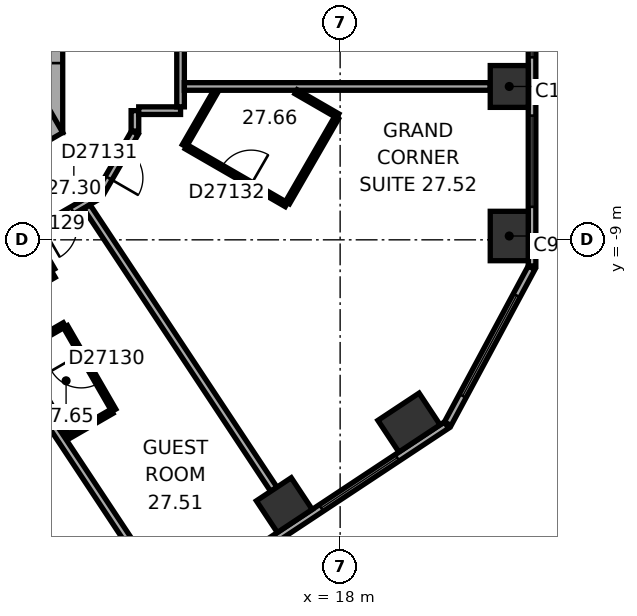
"""IFC4 building model, lengths in metres.
Left out: names, types, materials, properties, quantities, classifications, styles, units other than length and angle.
Written with IfcOpenShell. Run it as: python <this file> out.ifc"""

import sys

from ifc_helpers import new_model, si_unit, direction, frame, frame_2d, origin, origin_2d, place, context, subcontext, project, spatial, rectangle, extrude, element, fill, save


model = new_model("IFC4")
c1 = context("Model", 3, precision=1e-05, world=origin(), true_north=direction((0.0, 1.0)))
c2 = subcontext(c1, "Body", "Model", "MODEL_VIEW")
j1 = project(units=[si_unit("LENGTHUNIT", "METRE"), si_unit("PLANEANGLEUNIT", "RADIAN")], contexts=[c1])
p1 = place(None, origin())
s1 = spatial("IfcSite", under=j1, at=p1, CompositionType="ELEMENT")
p2 = place(p1, origin())
s2 = spatial("IfcBuilding", under=s1, at=p2, CompositionType="ELEMENT")
p3 = place(p2, frame((0.0, 0.0, 113.3)))
s3 = spatial("IfcBuildingStorey", under=s2, at=p3, CompositionType="ELEMENT", Elevation=113.3)
p4 = place(p3, frame((22.45, -8.899, 0.0), z_axis=(0.0, 0.0, 1.0), x_axis=(0.0, 1.0, 0.0)))
e1 = element("IfcColumn", 1, at=p4, inside=s3, PredefinedType="COLUMN", context=c2, shape_type="SweptSolid", body=[
    extrude(rectangle(XDim=1.3, YDim=1.0, at=origin_2d()), origin(), (0.0, 0.0, 1.0), 3.3),
])
for number, where, z_axis, x_axis in (
    (2, (22.45, -4.965, 0.0), (0.0, 0.0, 1.0), (0.0, 1.0, 0.0)),
    (3, (16.531, -15.981, 0.0), (0.0, 0.0, 1.0), (0.834, 0.552, 0.0)),
):
    element("IfcColumn", number, at=place(p3, frame(where, z_axis=z_axis, x_axis=x_axis)), inside=s3, PredefinedType="COLUMN", context=c2, shape_type="SweptSolid", body=[
        extrude(rectangle(XDim=1.1, YDim=1.0, at=origin_2d()), origin(), (0.0, 0.0, 1.0), 3.3),
    ])
p5 = place(p3, frame((19.812, -13.809, 0.0), z_axis=(0.0, 0.0, 1.0), x_axis=(0.833885822067, 0.551936985312, 0.0)))
e4 = element("IfcColumn", 4, at=p5, inside=s3, PredefinedType="COLUMN", context=c2, shape_type="SweptSolid", body=[
    extrude(rectangle(XDim=1.3, YDim=1.0, at=origin_2d()), origin(), (0.0, 0.0, 1.0), 3.3),
])
p6 = place(p3, frame((10.1, -6.177, 0.0), z_axis=(0.0, 0.0, 1.0), x_axis=(0.0, 1.0, 0.0)))
e5 = element("IfcWall", 5, at=p6, inside=s3, PredefinedType="SHEAR", context=c2, shape_type="SweptSolid", body=[
    extrude(rectangle(XDim=12.355, YDim=1.2, at=frame_2d((6.177, 0.0))), origin(), (0.0, 0.0, 1.0), 3.3),
])
p7 = place(p6, frame((6.378, 0.0, 0.0)))
e6 = element("IfcOpeningElement", 6, at=p7, cuts=e5, PredefinedType="OPENING", context=c2, shape_type="SweptSolid", body=[
    extrude(rectangle(XDim=1.5, YDim=2.1, at=frame_2d((0.75, 1.05))), frame((0.0, 0.61, 0.0), z_axis=(0.0, -1.0, 0.0), x_axis=(1.0, 0.0, 0.0)), (0.0, 0.0, 1.0), 1.22),
])
p8 = place(p6, frame((1.828, 0.0, 0.0)))
e7 = element("IfcOpeningElement", 7, at=p8, cuts=e5, PredefinedType="OPENING", context=c2, shape_type="SweptSolid", body=[
    extrude(rectangle(XDim=1.1, YDim=2.1, at=frame_2d((0.55, 1.05))), frame((0.0, 0.61, 0.0), z_axis=(0.0, -1.0, 0.0), x_axis=(1.0, 0.0, 0.0)), (0.0, 0.0, 1.0), 1.22),
])
p9 = place(p6, frame((4.427, 0.0, 0.0)))
e8 = element("IfcOpeningElement", 8, at=p9, cuts=e5, PredefinedType="OPENING", context=c2, shape_type="SweptSolid", body=[
    extrude(rectangle(XDim=1.1, YDim=2.1, at=frame_2d((0.55, 1.05))), frame((0.0, 0.61, 0.0), z_axis=(0.0, -1.0, 0.0), x_axis=(1.0, 0.0, 0.0)), (0.0, 0.0, 1.0), 1.22),
])
p10 = place(p3, frame((-0.3, -11.836, 0.0), z_axis=(0.0, 0.0, 1.0), x_axis=(0.866021384402, 0.500006961711, 0.0)))
e9 = element("IfcWall", 9, at=p10, inside=s3, PredefinedType="SHEAR", context=c2, shape_type="SweptSolid", body=[
    extrude(rectangle(XDim=12.355, YDim=1.2, at=frame_2d((6.178, 0.0))), origin(), (0.0, 0.0, 1.0), 3.3),
])
p11 = place(p10, frame((4.128, 0.0, 0.0)))
e10 = element("IfcOpeningElement", 10, at=p11, cuts=e9, PredefinedType="OPENING", context=c2, shape_type="SweptSolid", body=[
    extrude(rectangle(XDim=0.9, YDim=2.1, at=frame_2d((0.45, 1.05))), frame((0.0, 0.61, 0.0), z_axis=(0.0, -1.0, 0.0), x_axis=(1.0, 0.0, 0.0)), (0.0, 0.0, 1.0), 1.22),
])
p12 = place(p10, frame((7.928, 0.0, 0.0)))
e11 = element("IfcOpeningElement", 11, at=p12, cuts=e9, PredefinedType="OPENING", context=c2, shape_type="SweptSolid", body=[
    extrude(rectangle(XDim=1.1, YDim=2.1, at=frame_2d((0.55, 1.05))), frame((0.0, 0.61, 0.0), z_axis=(0.0, -1.0, 0.0), x_axis=(1.0, 0.0, 0.0)), (0.0, 0.0, 1.0), 1.22),
])
p13 = place(p3, frame((23.05, -9.687, 0.0), z_axis=(0.0, 0.0, 1.0), x_axis=(0.0, 1.0, 0.0)))
e12 = element("IfcWall", 12, at=p13, inside=s3, PredefinedType="STANDARD", context=c2, shape_type="SweptSolid", body=[
    extrude(rectangle(XDim=21.246, YDim=0.2, at=frame_2d((10.623, 0.0))), origin(), (0.0, 0.0, 1.0), 3.3),
])
p14 = place(p13, frame((1.555, 0.0, 0.8)))
e13 = element("IfcOpeningElement", 13, at=p14, cuts=e12, PredefinedType="OPENING", context=c2, shape_type="SweptSolid", body=[
    extrude(rectangle(XDim=2.4, YDim=1.7, at=frame_2d((1.2, 0.85))), frame((0.0, 0.11, 0.0), z_axis=(0.0, -1.0, 0.0), x_axis=(1.0, 0.0, 0.0)), (0.0, 0.0, 1.0), 0.22),
])
p15 = place(p13, frame((5.489, 0.0, 0.8)))
e14 = element("IfcOpeningElement", 14, at=p15, cuts=e12, PredefinedType="OPENING", context=c2, shape_type="SweptSolid", body=[
    extrude(rectangle(XDim=2.4, YDim=1.7, at=frame_2d((1.2, 0.85))), frame((0.0, 0.11, 0.0), z_axis=(0.0, -1.0, 0.0), x_axis=(1.0, 0.0, 0.0)), (0.0, 0.0, 1.0), 0.22),
])
p16 = place(p13, frame((9.424, 0.0, 0.8)))
e15 = element("IfcOpeningElement", 15, at=p16, cuts=e12, PredefinedType="OPENING", context=c2, shape_type="SweptSolid", body=[
    extrude(rectangle(XDim=2.4, YDim=1.7, at=frame_2d((1.2, 0.85))), frame((0.0, 0.11, 0.0), z_axis=(0.0, -1.0, 0.0), x_axis=(1.0, 0.0, 0.0)), (0.0, 0.0, 1.0), 0.22),
])
p17 = place(p13, frame((13.358, 0.0, 0.8)))
e16 = element("IfcOpeningElement", 16, at=p17, cuts=e12, PredefinedType="OPENING", context=c2, shape_type="SweptSolid", body=[
    extrude(rectangle(XDim=2.4, YDim=1.7, at=frame_2d((1.2, 0.85))), frame((0.0, 0.11, 0.0), z_axis=(0.0, -1.0, 0.0), x_axis=(1.0, 0.0, 0.0)), (0.0, 0.0, 1.0), 0.22),
])
p18 = place(p13, frame((17.293, 0.0, 0.8)))
e17 = element("IfcOpeningElement", 17, at=p18, cuts=e12, PredefinedType="OPENING", context=c2, shape_type="SweptSolid", body=[
    extrude(rectangle(XDim=2.4, YDim=1.7, at=frame_2d((1.2, 0.85))), frame((0.0, 0.11, 0.0), z_axis=(0.0, -1.0, 0.0), x_axis=(1.0, 0.0, 0.0)), (0.0, 0.0, 1.0), 0.22),
])
p19 = place(p3, frame((3.083, -25.601, 0.0), z_axis=(0.0, 0.0, 1.0), x_axis=(0.833884295743, 0.551939291329, 0.0)))
e18 = element("IfcWall", 18, at=p19, inside=s3, PredefinedType="STANDARD", context=c2, shape_type="SweptSolid", body=[
    extrude(rectangle(XDim=21.246, YDim=0.2, at=frame_2d((10.623, 0.0))), origin(), (0.0, 0.0, 1.0), 3.3),
])
p20 = place(p19, frame((1.553, 0.0, 0.8)))
e19 = element("IfcOpeningElement", 19, at=p20, cuts=e18, PredefinedType="OPENING", context=c2, shape_type="SweptSolid", body=[
    extrude(rectangle(XDim=2.4, YDim=1.7, at=frame_2d((1.2, 0.85))), frame((0.0, 0.11, 0.0), z_axis=(0.0, -1.0, 0.0), x_axis=(1.0, 0.0, 0.0)), (0.0, 0.0, 1.0), 0.22),
])
p21 = place(p19, frame((5.488, 0.0, 0.8)))
e20 = element("IfcOpeningElement", 20, at=p21, cuts=e18, PredefinedType="OPENING", context=c2, shape_type="SweptSolid", body=[
    extrude(rectangle(XDim=2.4, YDim=1.7, at=frame_2d((1.2, 0.85))), frame((0.0, 0.11, 0.0), z_axis=(0.0, -1.0, 0.0), x_axis=(1.0, 0.0, 0.0)), (0.0, 0.0, 1.0), 0.22),
])
p22 = place(p19, frame((9.422, 0.0, 0.8)))
e21 = element("IfcOpeningElement", 21, at=p22, cuts=e18, PredefinedType="OPENING", context=c2, shape_type="SweptSolid", body=[
    extrude(rectangle(XDim=2.4, YDim=1.7, at=frame_2d((1.2, 0.85))), frame((0.0, 0.11, 0.0), z_axis=(0.0, -1.0, 0.0), x_axis=(1.0, 0.0, 0.0)), (0.0, 0.0, 1.0), 0.22),
])
p23 = place(p19, frame((13.357, 0.0, 0.8)))
e22 = element("IfcOpeningElement", 22, at=p23, cuts=e18, PredefinedType="OPENING", context=c2, shape_type="SweptSolid", body=[
    extrude(rectangle(XDim=2.4, YDim=1.7, at=frame_2d((1.2, 0.85))), frame((0.0, 0.11, 0.0), z_axis=(0.0, -1.0, 0.0), x_axis=(1.0, 0.0, 0.0)), (0.0, 0.0, 1.0), 0.22),
])
p24 = place(p19, frame((17.291, 0.0, 0.8)))
e23 = element("IfcOpeningElement", 23, at=p24, cuts=e18, PredefinedType="OPENING", context=c2, shape_type="SweptSolid", body=[
    extrude(rectangle(XDim=2.4, YDim=1.7, at=frame_2d((1.2, 0.85))), frame((0.0, 0.11, 0.0), z_axis=(0.0, -1.0, 0.0), x_axis=(1.0, 0.0, 0.0)), (0.0, 0.0, 1.0), 0.22),
])
p25 = place(p3, frame((20.833, -13.839, 0.0), z_axis=(0.0, 0.0, 1.0), x_axis=(0.473321668581, 0.880889662813, 0.0)))
e24 = element("IfcWall", 24, at=p25, inside=s3, PredefinedType="STANDARD", context=c2, shape_type="SweptSolid", body=[
    extrude(rectangle(XDim=4.66, YDim=0.2, at=frame_2d((2.33, 0.0))), origin(), (0.0, 0.0, 1.0), 3.3),
])
p26 = place(p25, frame((0.83, 0.0, 0.8)))
e25 = element("IfcOpeningElement", 25, at=p26, cuts=e24, PredefinedType="OPENING", context=c2, shape_type="SweptSolid", body=[
    extrude(rectangle(XDim=3.0, YDim=1.7, at=frame_2d((1.5, 0.85))), frame((0.0, 0.11, 0.0), z_axis=(0.0, -1.0, 0.0), x_axis=(1.0, 0.0, 0.0)), (0.0, 0.0, 1.0), 0.22),
])
p27 = place(p3, frame((7.419, -11.653, 0.0), z_axis=(0.0, 0.0, 1.0), x_axis=(0.866038154057, 0.49997791523, 0.0)))
e26 = element("IfcWall", 26, at=p27, inside=s3, PredefinedType="PARTITIONING", context=c2, shape_type="SweptSolid", body=[
    extrude(rectangle(XDim=3.502, YDim=0.2, at=frame_2d((1.751, 0.0))), origin(), (0.0, 0.0, 1.0), 3.05),
])
p28 = place(p3, frame((9.532, -11.934, 0.0), z_axis=(0.0, 0.0, 1.0), x_axis=(0.866034573852, 0.49998411664, 0.0)))
e27 = element("IfcWall", 27, at=p28, inside=s3, PredefinedType="PARTITIONING", context=c2, shape_type="SweptSolid", body=[
    extrude(rectangle(XDim=1.4, YDim=0.12, at=frame_2d((0.7, 0.0))), origin(), (0.0, 0.0, 1.0), 3.05),
])
p29 = place(p3, frame((9.852, -8.861, 0.0), z_axis=(0.0, 0.0, 1.0), x_axis=(0.866013291437, 0.500020978615, 0.0)))
e28 = element("IfcWall", 28, at=p29, inside=s3, PredefinedType="PARTITIONING", context=c2, shape_type="SweptSolid", body=[
    extrude(rectangle(XDim=2.077, YDim=0.2, at=frame_2d((1.038, 0.0))), origin(), (0.0, 0.0, 1.0), 3.05),
])
p30 = place(p29, frame((0.372, 0.0, 0.0)))
e29 = element("IfcOpeningElement", 29, at=p30, cuts=e28, PredefinedType="OPENING", context=c2, shape_type="SweptSolid", body=[
    extrude(rectangle(XDim=0.9, YDim=2.1, at=frame_2d((0.45, 1.05))), frame((0.0, 0.11, 0.0), z_axis=(0.0, -1.0, 0.0), x_axis=(1.0, 0.0, 0.0)), (0.0, 0.0, 1.0), 0.22),
])
p31 = place(p3, frame((10.402, -9.815, 0.0), z_axis=(0.0, 0.0, 1.0), x_axis=(-0.499968756647, 0.866043441391, 0.0)))
e30 = element("IfcWall", 30, at=p31, inside=s3, PredefinedType="PARTITIONING", context=c2, shape_type="SweptSolid", body=[
    extrude(rectangle(XDim=1.001, YDim=0.2, at=frame_2d((0.5, 0.0))), origin(), (0.0, 0.0, 1.0), 3.05),
])
p32 = place(p3, frame((10.775, -11.286, 0.0), z_axis=(0.0, 0.0, 1.0), x_axis=(0.500046963369, -0.865998287773, 0.0)))
e31 = element("IfcWall", 31, at=p32, inside=s3, PredefinedType="PARTITIONING", context=c2, shape_type="SweptSolid", body=[
    extrude(rectangle(XDim=2.54, YDim=0.12, at=frame_2d((1.27, 0.0))), origin(), (0.0, 0.0, 1.0), 3.05),
])
p33 = place(p32, frame((0.82, 0.0, 0.0)))
e32 = element("IfcOpeningElement", 32, at=p33, cuts=e31, PredefinedType="OPENING", context=c2, shape_type="SweptSolid", body=[
    extrude(rectangle(XDim=0.9, YDim=2.1, at=frame_2d((0.45, 1.05))), frame((0.0, 0.07, 0.0), z_axis=(0.0, -1.0, 0.0), x_axis=(1.0, 0.0, 0.0)), (0.0, 0.0, 1.0), 0.14),
])
p34 = place(p3, frame((10.833, -14.185, 0.0), z_axis=(0.0, 0.0, 1.0), x_axis=(-0.500005339912, 0.866022320763, 0.0)))
e33 = element("IfcWall", 33, at=p34, inside=s3, PredefinedType="PARTITIONING", context=c2, shape_type="SweptSolid", body=[
    extrude(rectangle(XDim=2.54, YDim=0.12, at=frame_2d((1.27, 0.0))), origin(), (0.0, 0.0, 1.0), 3.05),
])
p35 = place(p3, frame((11.67, -7.788, 0.0), z_axis=(0.0, 0.0, 1.0), x_axis=(0.500063286585, 0.865988862174, 0.0)))
e34 = element("IfcWall", 34, at=p35, inside=s3, PredefinedType="PARTITIONING", context=c2, shape_type="SweptSolid", body=[
    extrude(rectangle(XDim=1.86, YDim=0.2, at=frame_2d((0.93, 0.0))), origin(), (0.0, 0.0, 1.0), 3.05),
])
p36 = place(p35, frame((0.48, 0.0, 0.0)))
e35 = element("IfcOpeningElement", 35, at=p36, cuts=e34, PredefinedType="OPENING", context=c2, shape_type="SweptSolid", body=[
    extrude(rectangle(XDim=0.9, YDim=2.1, at=frame_2d((0.45, 1.05))), frame((0.0, 0.11, 0.0), z_axis=(0.0, -1.0, 0.0), x_axis=(1.0, 0.0, 0.0)), (0.0, 0.0, 1.0), 0.22),
])
p37 = place(p3, frame((11.993, -13.515, 0.0), z_axis=(0.0, 0.0, 1.0), x_axis=(-0.865956862152, -0.500118698802, 0.0)))
e36 = element("IfcWall", 36, at=p37, inside=s3, PredefinedType="PARTITIONING", context=c2, shape_type="SweptSolid", body=[
    extrude(rectangle(XDim=1.28, YDim=0.12, at=frame_2d((0.64, 0.0))), origin(), (0.0, 0.0, 1.0), 3.05),
])
p38 = place(p3, frame((12.6, -6.138, 0.0), z_axis=(0.0, 0.0, 1.0), x_axis=(0.0, 1.0, 0.0)))
e37 = element("IfcWall", 37, at=p38, inside=s3, PredefinedType="PARTITIONING", context=c2, shape_type="SweptSolid", body=[
    extrude(rectangle(XDim=0.537, YDim=0.2, at=frame_2d((0.268, 0.0))), origin(), (0.0, 0.0, 1.0), 3.05),
])
p39 = place(p3, frame((12.7, -5.601, 0.0), z_axis=(0.0, 0.0, 1.0), x_axis=(1.0, 0.0, 0.0)))
e38 = element("IfcWall", 38, at=p39, inside=s3, PredefinedType="PARTITIONING", context=c2, shape_type="SweptSolid", body=[
    extrude(rectangle(XDim=1.101, YDim=0.2, at=frame_2d((0.551, 0.0))), origin(), (0.0, 0.0, 1.0), 3.05),
])
p40 = place(p3, frame((12.974, -17.735, 0.0), z_axis=(0.0, 0.0, 1.0), x_axis=(-0.55192625685, 0.833892922982, 0.0)))
e39 = element("IfcWall", 39, at=p40, inside=s3, PredefinedType="PARTITIONING", context=c2, shape_type="SweptSolid", body=[
    extrude(rectangle(XDim=7.95, YDim=0.2, at=frame_2d((3.975, 0.0))), origin(), (0.0, 0.0, 1.0), 3.05),
])
p41 = place(p3, frame((13.801, -5.501, 0.0), z_axis=(0.0, 0.0, 1.0), x_axis=(0.0, 1.0, 0.0)))
e40 = element("IfcWall", 40, at=p41, inside=s3, PredefinedType="PARTITIONING", context=c2, shape_type="SweptSolid", body=[
    extrude(rectangle(XDim=5.702, YDim=0.2, at=frame_2d((2.851, 0.0))), origin(), (0.0, 0.0, 1.0), 3.05),
])
p42 = place(p41, frame((2.619, 0.0, 0.0)))
e41 = element("IfcOpeningElement", 41, at=p42, cuts=e40, PredefinedType="OPENING", context=c2, shape_type="SweptSolid", body=[
    extrude(rectangle(XDim=1.0, YDim=2.1, at=frame_2d((0.5, 1.05))), frame((0.0, 0.11, 0.0), z_axis=(0.0, -1.0, 0.0), x_axis=(1.0, 0.0, 0.0)), (0.0, 0.0, 1.0), 0.22),
])
p43 = place(p3, frame((13.901, -6.524, 0.0), z_axis=(0.0, 0.0, 1.0), x_axis=(0.499964162598, 0.86604609353, 0.0)))
e42 = element("IfcWall", 42, at=p43, inside=s3, PredefinedType="PARTITIONING", context=c2, shape_type="SweptSolid", body=[
    extrude(rectangle(XDim=1.661, YDim=0.12, at=frame_2d((0.831, 0.0))), origin(), (0.0, 0.0, 1.0), 3.05),
])
p44 = place(p3, frame((13.901, -4.965, 0.0), z_axis=(0.0, 0.0, 1.0), x_axis=(1.0, 0.0, 0.0)))
e43 = element("IfcWall", 43, at=p44, inside=s3, PredefinedType="PARTITIONING", context=c2, shape_type="SweptSolid", body=[
    extrude(rectangle(XDim=8.049, YDim=0.2, at=frame_2d((4.024, 0.0))), origin(), (0.0, 0.0, 1.0), 3.05),
])
p45 = place(p3, frame((16.255, -15.564, 0.0), z_axis=(0.0, 0.0, 1.0), x_axis=(-0.55192208744, 0.833895682562, 0.0)))
e44 = element("IfcWall", 44, at=p45, inside=s3, PredefinedType="PARTITIONING", context=c2, shape_type="SweptSolid", body=[
    extrude(rectangle(XDim=8.913, YDim=0.2, at=frame_2d((4.457, 0.0))), origin(), (0.0, 0.0, 1.0), 2.6),
])
p46 = place(p3, frame((16.585, -8.074, 0.0), z_axis=(0.0, 0.0, 1.0), x_axis=(-0.86601037836, 0.500026023896, 0.0)))
e45 = element("IfcWall", 45, at=p46, inside=s3, PredefinedType="PARTITIONING", context=c2, shape_type="SweptSolid", body=[
    extrude(rectangle(XDim=3.04, YDim=0.12, at=frame_2d((1.52, 0.0))), origin(), (0.0, 0.0, 1.0), 3.05),
])
p47 = place(p46, frame((1.07, 0.0, 0.0)))
e46 = element("IfcOpeningElement", 46, at=p47, cuts=e45, PredefinedType="OPENING", context=c2, shape_type="SweptSolid", body=[
    extrude(rectangle(XDim=0.9, YDim=2.1, at=frame_2d((0.45, 1.05))), frame((0.0, 0.07, 0.0), z_axis=(0.0, -1.0, 0.0), x_axis=(1.0, 0.0, 0.0)), (0.0, 0.0, 1.0), 0.14),
])
p48 = place(p3, frame((16.841, -5.104, 0.0), z_axis=(0.0, 0.0, 1.0), x_axis=(0.865998956469, -0.500045805297, 0.0)))
e47 = element("IfcWall", 47, at=p48, inside=s3, PredefinedType="PARTITIONING", context=c2, shape_type="SweptSolid", body=[
    extrude(rectangle(XDim=1.264, YDim=0.12, at=frame_2d((0.632, 0.0))), origin(), (0.0, 0.0, 1.0), 3.05),
])
p49 = place(p3, frame((17.906, -5.788, 0.0), z_axis=(0.0, 0.0, 1.0), x_axis=(-0.500047388771, -0.865998042136, 0.0)))
e48 = element("IfcWall", 48, at=p49, inside=s3, PredefinedType="PARTITIONING", context=c2, shape_type="SweptSolid", body=[
    extrude(rectangle(XDim=2.58, YDim=0.12, at=frame_2d((1.29, 0.0))), origin(), (0.0, 0.0, 1.0), 3.05),
])
p50 = place(p14, origin())
e49 = element("IfcWindow", 49, at=p50, inside=s3, PartitioningType="SINGLE_PANEL", PredefinedType="WINDOW", context=c2, shape_type="SweptSolid", body=[
    extrude(rectangle(XDim=2.4, YDim=1.7, at=frame_2d((1.2, 0.85))), frame((0.0, 0.03, 0.0), z_axis=(0.0, -1.0, 0.0), x_axis=(1.0, 0.0, 0.0)), (0.0, 0.0, 1.0), 0.06),
])
fill(e13, e49)
p51 = place(p15, origin())
e50 = element("IfcWindow", 50, at=p51, inside=s3, PartitioningType="SINGLE_PANEL", PredefinedType="WINDOW", context=c2, shape_type="SweptSolid", body=[
    extrude(rectangle(XDim=2.4, YDim=1.7, at=frame_2d((1.2, 0.85))), frame((0.0, 0.03, 0.0), z_axis=(0.0, -1.0, 0.0), x_axis=(1.0, 0.0, 0.0)), (0.0, 0.0, 1.0), 0.06),
])
fill(e14, e50)
p52 = place(p24, origin())
e51 = element("IfcWindow", 51, at=p52, inside=s3, PartitioningType="SINGLE_PANEL", PredefinedType="WINDOW", context=c2, shape_type="SweptSolid", body=[
    extrude(rectangle(XDim=2.4, YDim=1.7, at=frame_2d((1.2, 0.85))), frame((0.0, 0.03, 0.0), z_axis=(0.0, -1.0, 0.0), x_axis=(1.0, 0.0, 0.0)), (0.0, 0.0, 1.0), 0.06),
])
fill(e23, e51)
p53 = place(p26, origin())
e52 = element("IfcWindow", 52, at=p53, inside=s3, PartitioningType="SINGLE_PANEL", PredefinedType="WINDOW", context=c2, shape_type="SweptSolid", body=[
    extrude(rectangle(XDim=3.0, YDim=1.7, at=frame_2d((1.5, 0.85))), frame((0.0, 0.03, 0.0), z_axis=(0.0, -1.0, 0.0), x_axis=(1.0, 0.0, 0.0)), (0.0, 0.0, 1.0), 0.06),
])
fill(e25, e52)
p54 = place(p30, origin())
e53 = element("IfcDoor", 53, at=p54, inside=s3, OperationType="SINGLE_SWING_LEFT", PredefinedType="DOOR", context=c2, shape_type="SweptSolid", body=[
    extrude(rectangle(XDim=0.9, YDim=2.1, at=frame_2d((0.45, 1.05))), frame((0.0, 0.025, 0.0), z_axis=(0.0, -1.0, 0.0), x_axis=(1.0, 0.0, 0.0)), (0.0, 0.0, 1.0), 0.05),
])
fill(e29, e53)
p55 = place(p33, origin())
e54 = element("IfcDoor", 54, at=p55, inside=s3, OperationType="SINGLE_SWING_LEFT", PredefinedType="DOOR", context=c2, shape_type="SweptSolid", body=[
    extrude(rectangle(XDim=0.9, YDim=2.1, at=frame_2d((0.45, 1.05))), frame((0.0, 0.025, 0.0), z_axis=(0.0, -1.0, 0.0), x_axis=(1.0, 0.0, 0.0)), (0.0, 0.0, 1.0), 0.05),
])
fill(e32, e54)
p56 = place(p36, origin())
e55 = element("IfcDoor", 55, at=p56, inside=s3, OperationType="SINGLE_SWING_LEFT", PredefinedType="DOOR", context=c2, shape_type="SweptSolid", body=[
    extrude(rectangle(XDim=0.9, YDim=2.1, at=frame_2d((0.45, 1.05))), frame((0.0, 0.025, 0.0), z_axis=(0.0, -1.0, 0.0), x_axis=(1.0, 0.0, 0.0)), (0.0, 0.0, 1.0), 0.05),
])
fill(e35, e55)
p57 = place(p47, origin())
e56 = element("IfcDoor", 56, at=p57, inside=s3, OperationType="SINGLE_SWING_LEFT", PredefinedType="DOOR", context=c2, shape_type="SweptSolid", body=[
    extrude(rectangle(XDim=0.9, YDim=2.1, at=frame_2d((0.45, 1.05))), frame((0.0, 0.025, 0.0), z_axis=(0.0, -1.0, 0.0), x_axis=(1.0, 0.0, 0.0)), (0.0, 0.0, 1.0), 0.05),
])
fill(e46, e56)
save(model, sys.argv[1])
